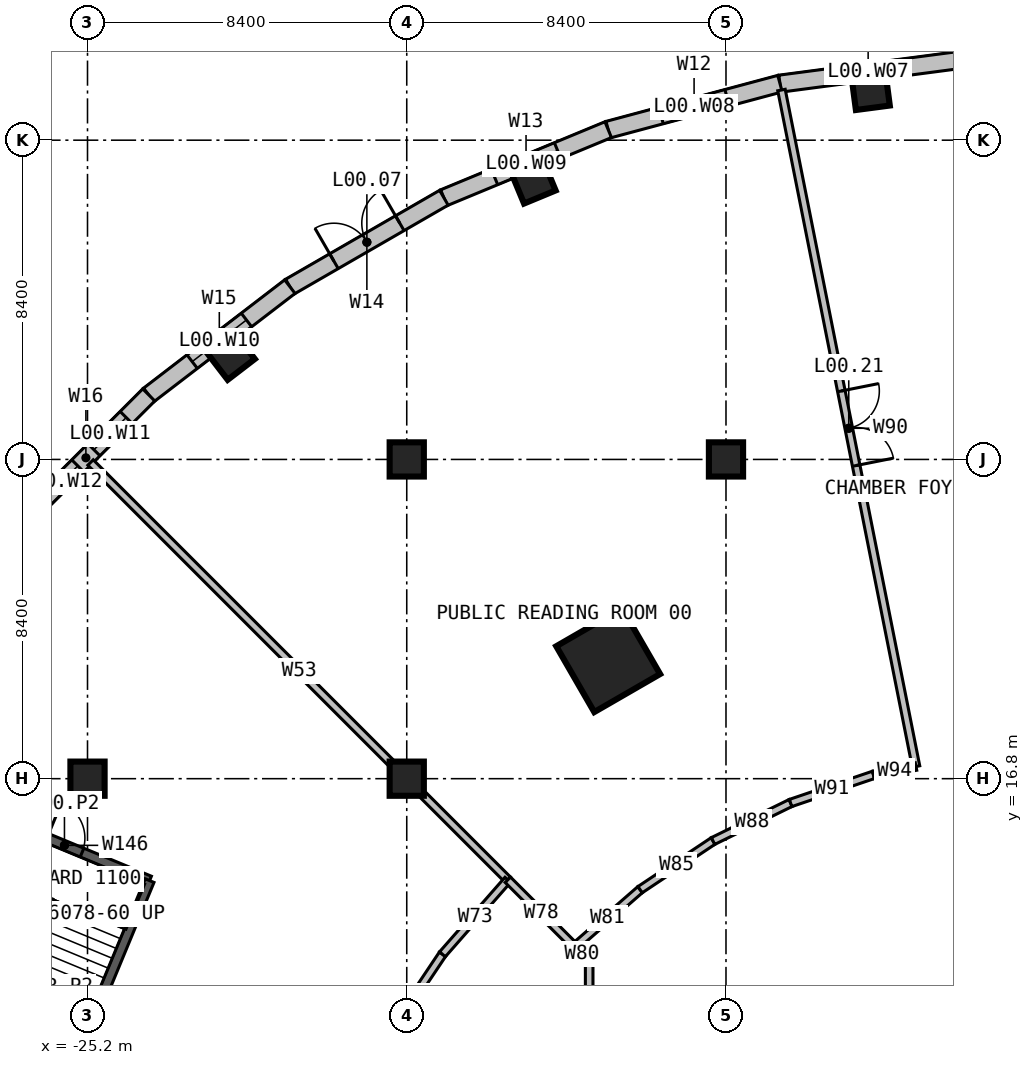
"""IFC4 building model, lengths in metres.
Left out: names, types, materials, properties, quantities, classifications, styles, units other than length and angle.
Written with IfcOpenShell. Run it as: python <this file> out.ifc"""

import sys

from ifc_helpers import new_model, si_unit, direction, frame, frame_2d, origin, origin_2d, place, context, subcontext, project, spatial, rectangle, hollow_rectangle, extrude, element, fill, save


model = new_model("IFC4")
c1 = context("Model", 3, precision=1e-05, world=origin(), true_north=direction((0.0, 1.0)))
c2 = subcontext(c1, "Body", "Model", "MODEL_VIEW")
j1 = project(units=[si_unit("LENGTHUNIT", "METRE"), si_unit("PLANEANGLEUNIT", "RADIAN")], contexts=[c1])
p1 = place(None, origin())
s1 = spatial("IfcSite", under=j1, at=p1, CompositionType="ELEMENT")
p2 = place(p1, origin())
s2 = spatial("IfcBuilding", under=s1, at=p2, CompositionType="ELEMENT")
p3 = place(p2, origin())
s3 = spatial("IfcBuildingStorey", under=s2, at=p3, CompositionType="ELEMENT", Elevation=0.0)
for number, where, z_axis, x_axis in (
    (1, (-25.2, 16.8, 0.0), (0.0, 0.0, 1.0), (1.0, 0.0, 0.0)),
    (2, (-16.8, 16.8, 0.0), (0.0, 0.0, 1.0), (1.0, 0.0, 0.0)),
    (3, (-16.8, 25.2, 0.0), (0.0, 0.0, 1.0), (1.0, 0.0, 0.0)),
    (4, (-8.4, 25.2, 0.0), (0.0, 0.0, 1.0), (1.0, 0.0, 0.0)),
    (5, (-4.594, 34.899, 0.0), (0.0, 0.0, 1.0), (-0.131, 0.991, 0.0)),
    (6, (-13.47, 32.521, 0.0), (0.0, 0.0, 1.0), (-0.383, 0.924, 0.0)),
    (7, (-21.428, 27.926, 0.0), (0.0, 0.0, 1.0), (-0.609, 0.793, 0.0)),
):
    element("IfcColumn", number, at=place(p3, frame(where, z_axis=z_axis, x_axis=x_axis)), inside=s3, PredefinedType="COLUMN", context=c2, shape_type="SweptSolid", body=[
        extrude(rectangle(XDim=0.9, YDim=0.9, at=origin_2d()), origin(), (0.0, 0.0, 1.0), 6.0),
    ])
p4 = place(p3, frame((-11.5, 19.919, 0.0), z_axis=(0.0, 0.0, 1.0), x_axis=(-0.5, 0.866025403784, 0.0)))
e8 = element("IfcColumn", 8, at=p4, inside=s3, PredefinedType="COLUMN", context=c2, shape_type="SweptSolid", body=[
    extrude(hollow_rectangle(XDim=2.0, YDim=2.0, WallThickness=0.24, at=origin_2d()), origin(), (0.0, 0.0, 1.0), 6.0),
])
p5 = place(p3, frame((-2.34, 35.698, 0.0), z_axis=(0.0, 0.0, 1.0), x_axis=(-0.991443459746, -0.130536838198, 0.0)))
e9 = element("IfcWall", 9, at=p5, inside=s3, PredefinedType="SOLIDWALL", context=c2, shape_type="SweptSolid", body=[
    extrude(rectangle(XDim=4.679, YDim=0.45, at=frame_2d((2.34, 0.0))), origin(), (0.0, 0.0, 1.0), 5.7),
])
p6 = place(p5, frame((1.44, 0.0, 0.9)))
e10 = element("IfcOpeningElement", 10, at=p6, cuts=e9, PredefinedType="OPENING", context=c2, shape_type="SweptSolid", body=[
    extrude(rectangle(XDim=1.8, YDim=3.6, at=frame_2d((0.9, 1.8))), frame((0.0, 0.235, 0.0), z_axis=(0.0, -1.0, 0.0), x_axis=(1.0, 0.0, 0.0)), (0.0, 0.0, 1.0), 0.47),
])
p7 = place(p3, frame((-6.979, 35.088, 0.0), z_axis=(0.0, 0.0, 1.0), x_axis=(-0.965926860523, -0.258815185258, 0.0)))
e11 = element("IfcWall", 11, at=p7, inside=s3, PredefinedType="SOLIDWALL", context=c2, shape_type="SweptSolid", body=[
    extrude(rectangle(XDim=4.68, YDim=0.45, at=frame_2d((2.34, 0.0))), origin(), (0.0, 0.0, 1.0), 5.7),
])
p8 = place(p7, frame((1.44, 0.0, 0.9)))
e12 = element("IfcOpeningElement", 12, at=p8, cuts=e11, PredefinedType="OPENING", context=c2, shape_type="SweptSolid", body=[
    extrude(rectangle(XDim=1.8, YDim=3.6, at=frame_2d((0.9, 1.8))), frame((0.0, 0.235, 0.0), z_axis=(0.0, -1.0, 0.0), x_axis=(1.0, 0.0, 0.0)), (0.0, 0.0, 1.0), 0.47),
])
p9 = place(p3, frame((-11.5, 33.876, 0.0), z_axis=(0.0, 0.0, 1.0), x_axis=(-0.923885213032, -0.382669718086, 0.0)))
e13 = element("IfcWall", 13, at=p9, inside=s3, PredefinedType="SOLIDWALL", context=c2, shape_type="SweptSolid", body=[
    extrude(rectangle(XDim=4.68, YDim=0.45, at=frame_2d((2.34, 0.0))), origin(), (0.0, 0.0, 1.0), 5.7),
])
p10 = place(p9, frame((1.44, 0.0, 0.9)))
e14 = element("IfcOpeningElement", 14, at=p10, cuts=e13, PredefinedType="OPENING", context=c2, shape_type="SweptSolid", body=[
    extrude(rectangle(XDim=1.8, YDim=3.6, at=frame_2d((0.9, 1.8))), frame((0.0, 0.235, 0.0), z_axis=(0.0, -1.0, 0.0), x_axis=(1.0, 0.0, 0.0)), (0.0, 0.0, 1.0), 0.47),
])
p11 = place(p3, frame((-15.823, 32.086, 0.0), z_axis=(0.0, 0.0, 1.0), x_axis=(-0.866012687223, -0.500022025083, 0.0)))
e15 = element("IfcWall", 15, at=p11, inside=s3, PredefinedType="SOLIDWALL", context=c2, shape_type="SweptSolid", body=[
    extrude(rectangle(XDim=4.679, YDim=0.45, at=frame_2d((2.34, 0.0))), origin(), (0.0, 0.0, 1.0), 5.7),
])
p12 = place(p11, frame((1.34, 0.0, 0.0)))
e16 = element("IfcOpeningElement", 16, at=p12, cuts=e15, PredefinedType="OPENING", context=c2, shape_type="SweptSolid", body=[
    extrude(rectangle(XDim=2.0, YDim=3.0, at=frame_2d((1.0, 1.5))), frame((0.0, 0.235, 0.0), z_axis=(0.0, -1.0, 0.0), x_axis=(1.0, 0.0, 0.0)), (0.0, 0.0, 1.0), 0.47),
])
p13 = place(p3, frame((-19.875, 29.746, 0.0), z_axis=(0.0, 0.0, 1.0), x_axis=(-0.79334682721, -0.608769916927, 0.0)))
e17 = element("IfcWall", 17, at=p13, inside=s3, PredefinedType="SOLIDWALL", context=c2, shape_type="SweptSolid", body=[
    extrude(rectangle(XDim=4.68, YDim=0.45, at=frame_2d((2.34, 0.0))), origin(), (0.0, 0.0, 1.0), 5.7),
])
p14 = place(p13, frame((1.44, 0.0, 0.9)))
e18 = element("IfcOpeningElement", 18, at=p14, cuts=e17, PredefinedType="OPENING", context=c2, shape_type="SweptSolid", body=[
    extrude(rectangle(XDim=1.8, YDim=3.6, at=frame_2d((0.9, 1.8))), frame((0.0, 0.235, 0.0), z_axis=(0.0, -1.0, 0.0), x_axis=(1.0, 0.0, 0.0)), (0.0, 0.0, 1.0), 0.47),
])
p15 = place(p3, frame((-23.588, 26.897, 0.0), z_axis=(0.0, 0.0, 1.0), x_axis=(-0.707106781187, -0.707106781187, 0.0)))
e19 = element("IfcWall", 19, at=p15, inside=s3, PredefinedType="SOLIDWALL", context=c2, shape_type="SweptSolid", body=[
    extrude(rectangle(XDim=4.679, YDim=0.45, at=frame_2d((2.34, 0.0))), origin(), (0.0, 0.0, 1.0), 5.7),
])
p16 = place(p15, frame((0.84, 0.0, 0.9)))
e20 = element("IfcOpeningElement", 20, at=p16, cuts=e19, PredefinedType="OPENING", context=c2, shape_type="SweptSolid", body=[
    extrude(rectangle(XDim=1.2, YDim=3.6, at=frame_2d((0.6, 1.8))), frame((0.0, 0.235, 0.0), z_axis=(0.0, -1.0, 0.0), x_axis=(1.0, 0.0, 0.0)), (0.0, 0.0, 1.0), 0.47),
])
p17 = place(p15, frame((2.64, 0.0, 0.9)))
e21 = element("IfcOpeningElement", 21, at=p17, cuts=e19, PredefinedType="OPENING", context=c2, shape_type="SweptSolid", body=[
    extrude(rectangle(XDim=1.2, YDim=3.6, at=frame_2d((0.6, 1.8))), frame((0.0, 0.235, 0.0), z_axis=(0.0, -1.0, 0.0), x_axis=(1.0, 0.0, 0.0)), (0.0, 0.0, 1.0), 0.47),
])
p18 = place(p3, frame((-28.047, 15.974, 0.0), z_axis=(0.0, 0.0, 1.0), x_axis=(0.923862828997, -0.382723755727, 0.0)))
e22 = element("IfcWall", 22, at=p18, inside=s3, PredefinedType="SOLIDWALL", context=c2, shape_type="SweptSolid", body=[
    extrude(rectangle(XDim=4.85, YDim=0.25, at=frame_2d((2.425, 0.0))), origin(), (0.0, 0.0, 1.0), 6.0),
])
p19 = place(p18, frame((1.925, 0.0, 0.0)))
e23 = element("IfcOpeningElement", 23, at=p19, cuts=e22, PredefinedType="OPENING", context=c2, shape_type="SweptSolid", body=[
    extrude(rectangle(XDim=1.0, YDim=2.2, at=frame_2d((0.5, 1.1))), frame((0.0, 0.135, 0.0), z_axis=(0.0, -1.0, 0.0), x_axis=(1.0, 0.0, 0.0)), (0.0, 0.0, 1.0), 0.27),
])
p20 = place(p3, frame((-23.566, 14.118, 0.0), z_axis=(0.0, 0.0, 1.0), x_axis=(-0.382689294869, -0.923877104161, 0.0)))
e24 = element("IfcWall", 24, at=p20, inside=s3, PredefinedType="SOLIDWALL", context=c2, shape_type="SweptSolid", body=[
    extrude(rectangle(XDim=8.05, YDim=0.25, at=frame_2d((4.025, 0.0))), origin(), (0.0, 0.0, 1.0), 6.0),
])
p21 = place(p3, frame((-25.12, 25.12, 0.0), z_axis=(0.0, 0.0, 1.0), x_axis=(0.707106781187, -0.707106781187, 0.0)))
e25 = element("IfcWall", 25, at=p21, inside=s3, PredefinedType="PARTITIONING", context=c2, shape_type="SweptSolid", body=[
    extrude(rectangle(XDim=15.528, YDim=0.2, at=frame_2d((7.764, 0.0))), origin(), (0.0, 0.0, 1.0), 5.7),
])
p22 = place(p3, frame((-17.32, 10.0, 0.0), z_axis=(0.0, 0.0, 1.0), x_axis=(0.556459812229, 0.83087452565, 0.0)))
e26 = element("IfcWall", 26, at=p22, inside=s3, PredefinedType="PARTITIONING", context=c2, shape_type="SweptSolid", body=[
    extrude(rectangle(XDim=2.624, YDim=0.2, at=frame_2d((1.312, 0.0))), origin(), (0.0, 0.0, 1.0), 5.7),
])
p23 = place(p3, frame((-15.86, 12.18, 0.0), z_axis=(0.0, 0.0, 1.0), x_axis=(0.659643857667, 0.751578326618, 0.0)))
e27 = element("IfcWall", 27, at=p23, inside=s3, PredefinedType="PARTITIONING", context=c2, shape_type="SweptSolid", body=[
    extrude(rectangle(XDim=2.608, YDim=0.2, at=frame_2d((1.304, 0.0))), origin(), (0.0, 0.0, 1.0), 5.7),
])
p24 = place(p3, frame((-14.14, 14.14, 0.0), z_axis=(0.0, 0.0, 1.0), x_axis=(0.707106781187, -0.707106781187, 0.0)))
e28 = element("IfcWall", 28, at=p24, inside=s3, PredefinedType="PARTITIONING", context=c2, shape_type="SweptSolid", body=[
    extrude(rectangle(XDim=2.489, YDim=0.2, at=frame_2d((1.245, 0.0))), origin(), (0.0, 0.0, 1.0), 5.7),
])
p25 = place(p3, frame((-12.38, 12.38, 0.0), z_axis=(0.0, 0.0, 1.0), x_axis=(0.707106781187, -0.707106781187, 0.0)))
e29 = element("IfcWall", 29, at=p25, inside=s3, PredefinedType="PARTITIONING", context=c2, shape_type="SweptSolid", body=[
    extrude(rectangle(XDim=0.537, YDim=0.2, at=frame_2d((0.269, 0.0))), origin(), (0.0, 0.0, 1.0), 5.7),
])
p26 = place(p3, frame((-12.38, 12.38, 0.0), z_axis=(0.0, 0.0, 1.0), x_axis=(0.753655870045, 0.657269221512, 0.0)))
e30 = element("IfcWall", 30, at=p26, inside=s3, PredefinedType="PARTITIONING", context=c2, shape_type="SweptSolid", body=[
    extrude(rectangle(XDim=2.282, YDim=0.2, at=frame_2d((1.141, 0.0))), origin(), (0.0, 0.0, 1.0), 5.7),
])
p27 = place(p3, frame((-10.66, 13.88, 0.0), z_axis=(0.0, 0.0, 1.0), x_axis=(0.83203401661, 0.554724612041, 0.0)))
e31 = element("IfcWall", 31, at=p27, inside=s3, PredefinedType="PARTITIONING", context=c2, shape_type="SweptSolid", body=[
    extrude(rectangle(XDim=2.308, YDim=0.2, at=frame_2d((1.154, 0.0))), origin(), (0.0, 0.0, 1.0), 5.7),
])
p28 = place(p3, frame((-8.74, 15.16, 0.0), z_axis=(0.0, 0.0, 1.0), x_axis=(0.897924053718, 0.440150421736, 0.0)))
e32 = element("IfcWall", 32, at=p28, inside=s3, PredefinedType="PARTITIONING", context=c2, shape_type="SweptSolid", body=[
    extrude(rectangle(XDim=2.272, YDim=0.2, at=frame_2d((1.136, 0.0))), origin(), (0.0, 0.0, 1.0), 5.7),
])
p29 = place(p3, frame((-6.94, 34.92, 0.0), z_axis=(0.0, 0.0, 1.0), x_axis=(0.195060521619, -0.9807912076, 0.0)))
e33 = element("IfcWall", 33, at=p29, inside=s3, PredefinedType="PARTITIONING", context=c2, shape_type="SweptSolid", body=[
    extrude(rectangle(XDim=18.148, YDim=0.2, at=frame_2d((9.074, 0.0))), origin(), (0.0, 0.0, 1.0), 5.7),
])
p30 = place(p29, frame((8.074, 0.0, 0.0)))
e34 = element("IfcOpeningElement", 34, at=p30, cuts=e33, PredefinedType="OPENING", context=c2, shape_type="SweptSolid", body=[
    extrude(rectangle(XDim=2.0, YDim=2.4, at=frame_2d((1.0, 1.2))), frame((0.0, 0.11, 0.0), z_axis=(0.0, -1.0, 0.0), x_axis=(1.0, 0.0, 0.0)), (0.0, 0.0, 1.0), 0.22),
])
p31 = place(p3, frame((-6.7, 16.16, 0.0), z_axis=(0.0, 0.0, 1.0), x_axis=(0.946929712354, 0.321440694159, 0.0)))
e35 = element("IfcWall", 35, at=p31, inside=s3, PredefinedType="PARTITIONING", context=c2, shape_type="SweptSolid", body=[
    extrude(rectangle(XDim=2.302, YDim=0.2, at=frame_2d((1.151, 0.0))), origin(), (0.0, 0.0, 1.0), 5.7),
])
p32 = place(p3, frame((-4.52, 16.9, 0.0), z_axis=(0.0, 0.0, 1.0), x_axis=(0.981217026057, 0.19290709623, 0.0)))
e36 = element("IfcWall", 36, at=p32, inside=s3, PredefinedType="PARTITIONING", context=c2, shape_type="SweptSolid", body=[
    extrude(rectangle(XDim=1.142, YDim=0.2, at=frame_2d((0.571, 0.0))), origin(), (0.0, 0.0, 1.0), 5.7),
])
p33 = place(p3, frame((-12.0, 12.0, 0.0), z_axis=(0.0, 0.0, 1.0), x_axis=(0.0, -1.0, 0.0)))
e37 = element("IfcWall", 37, at=p33, inside=s3, PredefinedType="PARTITIONING", context=c2, shape_type="SweptSolid", body=[
    extrude(rectangle(XDim=8.785, YDim=0.2, at=frame_2d((4.392, 0.0))), origin(), (0.0, 0.0, 1.0), 5.7),
])
p34 = place(p33, frame((3.892, 0.0, 0.0)))
e38 = element("IfcOpeningElement", 38, at=p34, cuts=e37, PredefinedType="OPENING", context=c2, shape_type="SweptSolid", body=[
    extrude(rectangle(XDim=1.0, YDim=2.2, at=frame_2d((0.5, 1.1))), frame((0.0, 0.11, 0.0), z_axis=(0.0, -1.0, 0.0), x_axis=(1.0, 0.0, 0.0)), (0.0, 0.0, 1.0), 0.22),
])
p35 = place(p6, origin())
e39 = element("IfcWindow", 39, at=p35, inside=s3, PartitioningType="SINGLE_PANEL", PredefinedType="WINDOW", context=c2, shape_type="SweptSolid", body=[
    extrude(rectangle(XDim=1.8, YDim=3.6, at=frame_2d((0.9, 1.8))), frame((0.0, 0.03, 0.0), z_axis=(0.0, -1.0, 0.0), x_axis=(1.0, 0.0, 0.0)), (0.0, 0.0, 1.0), 0.06),
])
fill(e10, e39)
p36 = place(p8, origin())
e40 = element("IfcWindow", 40, at=p36, inside=s3, PartitioningType="SINGLE_PANEL", PredefinedType="WINDOW", context=c2, shape_type="SweptSolid", body=[
    extrude(rectangle(XDim=1.8, YDim=3.6, at=frame_2d((0.9, 1.8))), frame((0.0, 0.03, 0.0), z_axis=(0.0, -1.0, 0.0), x_axis=(1.0, 0.0, 0.0)), (0.0, 0.0, 1.0), 0.06),
])
fill(e12, e40)
p37 = place(p10, origin())
e41 = element("IfcWindow", 41, at=p37, inside=s3, PartitioningType="SINGLE_PANEL", PredefinedType="WINDOW", context=c2, shape_type="SweptSolid", body=[
    extrude(rectangle(XDim=1.8, YDim=3.6, at=frame_2d((0.9, 1.8))), frame((0.0, 0.03, 0.0), z_axis=(0.0, -1.0, 0.0), x_axis=(1.0, 0.0, 0.0)), (0.0, 0.0, 1.0), 0.06),
])
fill(e14, e41)
p38 = place(p12, frame((2.0, 0.0, 0.0), z_axis=(0.0, 0.0, 1.0), x_axis=(-1.0, 0.0, 0.0)))
e42 = element("IfcDoor", 42, at=p38, inside=s3, OperationType="DOUBLE_DOOR_SINGLE_SWING", PredefinedType="DOOR", context=c2, shape_type="SweptSolid", body=[
    extrude(rectangle(XDim=2.0, YDim=3.0, at=frame_2d((1.0, 1.5))), frame((0.0, 0.025, 0.0), z_axis=(0.0, -1.0, 0.0), x_axis=(1.0, 0.0, 0.0)), (0.0, 0.0, 1.0), 0.05),
])
fill(e16, e42)
p39 = place(p14, origin())
e43 = element("IfcWindow", 43, at=p39, inside=s3, PartitioningType="SINGLE_PANEL", PredefinedType="WINDOW", context=c2, shape_type="SweptSolid", body=[
    extrude(rectangle(XDim=1.8, YDim=3.6, at=frame_2d((0.9, 1.8))), frame((0.0, 0.03, 0.0), z_axis=(0.0, -1.0, 0.0), x_axis=(1.0, 0.0, 0.0)), (0.0, 0.0, 1.0), 0.06),
])
fill(e18, e43)
p40 = place(p16, origin())
e44 = element("IfcWindow", 44, at=p40, inside=s3, PartitioningType="SINGLE_PANEL", PredefinedType="WINDOW", context=c2, shape_type="SweptSolid", body=[
    extrude(rectangle(XDim=1.2, YDim=3.6, at=frame_2d((0.6, 1.8))), frame((0.0, 0.03, 0.0), z_axis=(0.0, -1.0, 0.0), x_axis=(1.0, 0.0, 0.0)), (0.0, 0.0, 1.0), 0.06),
])
fill(e20, e44)
p41 = place(p17, origin())
e45 = element("IfcWindow", 45, at=p41, inside=s3, PartitioningType="SINGLE_PANEL", PredefinedType="WINDOW", context=c2, shape_type="SweptSolid", body=[
    extrude(rectangle(XDim=1.2, YDim=3.6, at=frame_2d((0.6, 1.8))), frame((0.0, 0.03, 0.0), z_axis=(0.0, -1.0, 0.0), x_axis=(1.0, 0.0, 0.0)), (0.0, 0.0, 1.0), 0.06),
])
fill(e21, e45)
p42 = place(p19, origin())
e46 = element("IfcDoor", 46, at=p42, inside=s3, OperationType="SINGLE_SWING_LEFT", PredefinedType="DOOR", context=c2, shape_type="SweptSolid", body=[
    extrude(rectangle(XDim=1.0, YDim=2.2, at=frame_2d((0.5, 1.1))), frame((0.0, 0.025, 0.0), z_axis=(0.0, -1.0, 0.0), x_axis=(1.0, 0.0, 0.0)), (0.0, 0.0, 1.0), 0.05),
])
fill(e23, e46)
p43 = place(p30, origin())
e47 = element("IfcDoor", 47, at=p43, inside=s3, OperationType="DOUBLE_DOOR_SINGLE_SWING", PredefinedType="DOOR", context=c2, shape_type="SweptSolid", body=[
    extrude(rectangle(XDim=2.0, YDim=2.4, at=frame_2d((1.0, 1.2))), frame((0.0, 0.025, 0.0), z_axis=(0.0, -1.0, 0.0), x_axis=(1.0, 0.0, 0.0)), (0.0, 0.0, 1.0), 0.05),
])
fill(e34, e47)
save(model, sys.argv[1])
